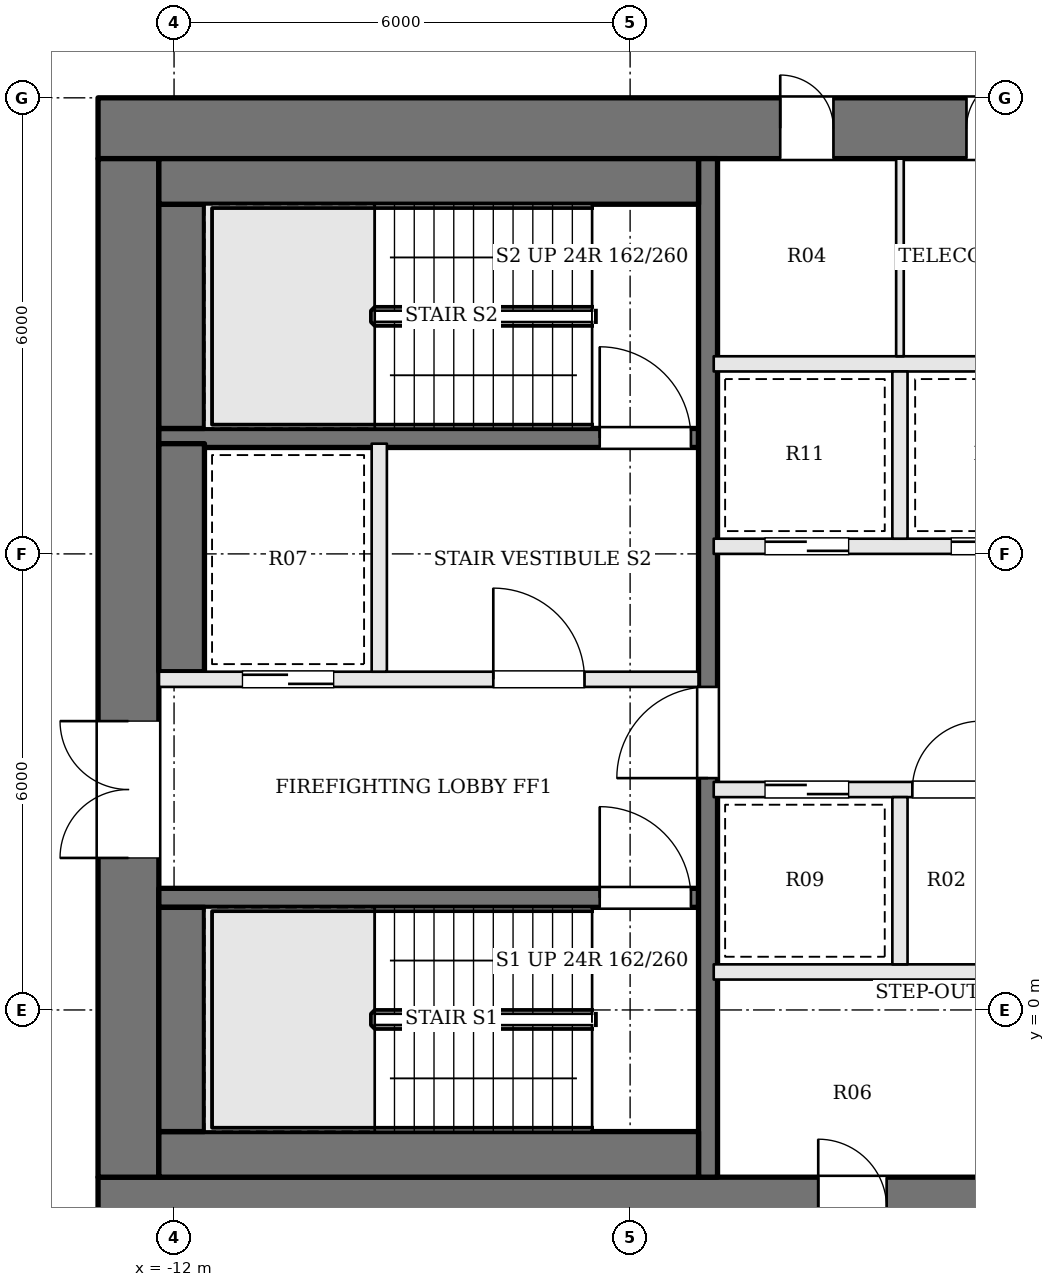
"""IFC4 building model, lengths in metres.
Left out: names, types, materials, properties, quantities, classifications, styles, units other than length and angle.
Written with IfcOpenShell. Run it as: python <this file> out.ifc"""

import sys

from ifc_helpers import new_model, si_unit, direction, frame, frame_2d, origin, place, context, subcontext, project, spatial, rectangle, extrude, element, fill, save


model = new_model("IFC4")
c1 = context("Model", 3, precision=1e-05, world=origin(), true_north=direction((0.0, 1.0)))
c2 = subcontext(c1, "Body", "Model", "MODEL_VIEW")
j1 = project(units=[si_unit("LENGTHUNIT", "METRE"), si_unit("PLANEANGLEUNIT", "RADIAN")], contexts=[c1])
p1 = place(None, origin())
s1 = spatial("IfcSite", under=j1, at=p1, CompositionType="ELEMENT")
p2 = place(p1, origin())
s2 = spatial("IfcBuilding", under=s1, at=p2, CompositionType="ELEMENT")
p3 = place(p2, frame((0.0, 0.0, 189.6)))
s3 = spatial("IfcBuildingStorey", under=s2, at=p3, CompositionType="ELEMENT", Elevation=189.6)
p4 = place(p3, frame((-13.0, 11.6, 0.0), z_axis=(0.0, 0.0, 1.0), x_axis=(1.0, 0.0, 0.0)))
e1 = element("IfcWall", 1, at=p4, inside=s3, PredefinedType="SHEAR", context=c2, shape_type="SweptSolid", body=[
    extrude(rectangle(XDim=26.0, YDim=0.8, at=frame_2d((13.0, 0.0))), origin(), (0.0, 0.0, 1.0), 3.9),
])
p5 = place(p4, frame((8.975, 0.0, 0.0)))
e2 = element("IfcOpeningElement", 2, at=p5, cuts=e1, PredefinedType="OPENING", context=c2, shape_type="SweptSolid", body=[
    extrude(rectangle(XDim=0.7, YDim=2.1, at=frame_2d((0.35, 1.05))), frame((0.0, 0.41, 0.0), z_axis=(0.0, -1.0, 0.0), x_axis=(1.0, 0.0, 0.0)), (0.0, 0.0, 1.0), 0.82),
])
p6 = place(p4, frame((11.425, 0.0, 0.0)))
e3 = element("IfcOpeningElement", 3, at=p6, cuts=e1, PredefinedType="OPENING", context=c2, shape_type="SweptSolid", body=[
    extrude(rectangle(XDim=0.7, YDim=2.1, at=frame_2d((0.35, 1.05))), frame((0.0, 0.41, 0.0), z_axis=(0.0, -1.0, 0.0), x_axis=(1.0, 0.0, 0.0)), (0.0, 0.0, 1.0), 0.82),
])
p7 = place(p4, frame((13.725, 0.0, 0.0)))
e4 = element("IfcOpeningElement", 4, at=p7, cuts=e1, PredefinedType="OPENING", context=c2, shape_type="SweptSolid", body=[
    extrude(rectangle(XDim=1.0, YDim=2.1, at=frame_2d((0.5, 1.05))), frame((0.0, 0.41, 0.0), z_axis=(0.0, -1.0, 0.0), x_axis=(1.0, 0.0, 0.0)), (0.0, 0.0, 1.0), 0.82),
])
p8 = place(p4, frame((16.175, 0.0, 0.0)))
e5 = element("IfcOpeningElement", 5, at=p8, cuts=e1, PredefinedType="OPENING", context=c2, shape_type="SweptSolid", body=[
    extrude(rectangle(XDim=1.0, YDim=2.1, at=frame_2d((0.5, 1.05))), frame((0.0, 0.41, 0.0), z_axis=(0.0, -1.0, 0.0), x_axis=(1.0, 0.0, 0.0)), (0.0, 0.0, 1.0), 0.82),
])
p9 = place(p3, frame((-13.0, -2.6, 0.0), z_axis=(0.0, 0.0, 1.0), x_axis=(1.0, 0.0, 0.0)))
e6 = element("IfcWall", 6, at=p9, inside=s3, PredefinedType="SHEAR", context=c2, shape_type="SweptSolid", body=[
    extrude(rectangle(XDim=26.0, YDim=0.8, at=frame_2d((13.0, 0.0))), origin(), (0.0, 0.0, 1.0), 3.9),
])
p10 = place(p9, frame((9.475, 0.0, 0.0)))
e7 = element("IfcOpeningElement", 7, at=p10, cuts=e6, PredefinedType="OPENING", context=c2, shape_type="SweptSolid", body=[
    extrude(rectangle(XDim=0.9, YDim=2.1, at=frame_2d((0.45, 1.05))), frame((0.0, 0.41, 0.0), z_axis=(0.0, -1.0, 0.0), x_axis=(1.0, 0.0, 0.0)), (0.0, 0.0, 1.0), 0.82),
])
p11 = place(p9, frame((12.75, 0.0, 0.0)))
e8 = element("IfcOpeningElement", 8, at=p11, cuts=e6, PredefinedType="OPENING", context=c2, shape_type="SweptSolid", body=[
    extrude(rectangle(XDim=0.9, YDim=2.1, at=frame_2d((0.45, 1.05))), frame((0.0, 0.41, 0.0), z_axis=(0.0, -1.0, 0.0), x_axis=(1.0, 0.0, 0.0)), (0.0, 0.0, 1.0), 0.82),
])
p12 = place(p9, frame((15.05, 0.0, 0.0)))
e9 = element("IfcOpeningElement", 9, at=p12, cuts=e6, PredefinedType="OPENING", context=c2, shape_type="SweptSolid", body=[
    extrude(rectangle(XDim=1.0, YDim=2.1, at=frame_2d((0.5, 1.05))), frame((0.0, 0.41, 0.0), z_axis=(0.0, -1.0, 0.0), x_axis=(1.0, 0.0, 0.0)), (0.0, 0.0, 1.0), 0.82),
])
p13 = place(p9, frame((16.825, 0.0, 0.0)))
e10 = element("IfcOpeningElement", 10, at=p13, cuts=e6, PredefinedType="OPENING", context=c2, shape_type="SweptSolid", body=[
    extrude(rectangle(XDim=0.7, YDim=2.1, at=frame_2d((0.35, 1.05))), frame((0.0, 0.41, 0.0), z_axis=(0.0, -1.0, 0.0), x_axis=(1.0, 0.0, 0.0)), (0.0, 0.0, 1.0), 0.82),
])
p14 = place(p3, frame((-12.6, -2.2, 0.0), z_axis=(0.0, 0.0, 1.0), x_axis=(0.0, 1.0, 0.0)))
e11 = element("IfcWall", 11, at=p14, inside=s3, PredefinedType="SHEAR", context=c2, shape_type="SweptSolid", body=[
    extrude(rectangle(XDim=13.4, YDim=0.8, at=frame_2d((6.7, 0.0))), origin(), (0.0, 0.0, 1.0), 3.9),
])
p15 = place(p14, frame((4.2, 0.0, 0.0)))
e12 = element("IfcOpeningElement", 12, at=p15, cuts=e11, PredefinedType="OPENING", context=c2, shape_type="SweptSolid", body=[
    extrude(rectangle(XDim=1.8, YDim=2.1, at=frame_2d((0.9, 1.05))), frame((0.0, 0.41, 0.0), z_axis=(0.0, -1.0, 0.0), x_axis=(1.0, 0.0, 0.0)), (0.0, 0.0, 1.0), 0.82),
])
p16 = place(p3, frame((-12.2, 1.475, 0.0), z_axis=(0.0, 0.0, 1.0), x_axis=(1.0, 0.0, 0.0)))
e13 = element("IfcWall", 13, at=p16, inside=s3, PredefinedType="SOLIDWALL", context=c2, shape_type="SweptSolid", body=[
    extrude(rectangle(XDim=7.1, YDim=0.25, at=frame_2d((3.55, 0.0))), origin(), (0.0, 0.0, 1.0), 3.7),
])
p17 = place(p16, frame((5.8, 0.0, 0.0)))
e14 = element("IfcOpeningElement", 14, at=p17, cuts=e13, PredefinedType="OPENING", context=c2, shape_type="SweptSolid", body=[
    extrude(rectangle(XDim=1.2, YDim=2.1, at=frame_2d((0.6, 1.05))), frame((0.0, 0.135, 0.0), z_axis=(0.0, -1.0, 0.0), x_axis=(1.0, 0.0, 0.0)), (0.0, 0.0, 1.0), 0.27),
])
p18 = place(p3, frame((-12.2, 4.35, 0.0), z_axis=(0.0, 0.0, 1.0), x_axis=(1.0, 0.0, 0.0)))
e15 = element("IfcWall", 15, at=p18, inside=s3, PredefinedType="SOLIDWALL", context=c2, shape_type="SweptSolid", body=[
    extrude(rectangle(XDim=7.1, YDim=0.2, at=frame_2d((3.55, 0.0))), origin(), (0.0, 0.0, 1.0), 3.7),
])
p19 = place(p18, frame((4.4, 0.0, 0.0)))
e16 = element("IfcOpeningElement", 16, at=p19, cuts=e15, PredefinedType="OPENING", context=c2, shape_type="SweptSolid", body=[
    extrude(rectangle(XDim=1.2, YDim=2.1, at=frame_2d((0.6, 1.05))), frame((0.0, 0.11, 0.0), z_axis=(0.0, -1.0, 0.0), x_axis=(1.0, 0.0, 0.0)), (0.0, 0.0, 1.0), 0.22),
])
p20 = place(p18, frame((1.1, 0.0, 0.0)))
e17 = element("IfcOpeningElement", 17, at=p20, cuts=e15, PredefinedType="OPENING", context=c2, shape_type="SweptSolid", body=[
    extrude(rectangle(XDim=1.2, YDim=2.1, at=frame_2d((0.6, 1.05))), frame((0.0, 0.11, 0.0), z_axis=(0.0, -1.0, 0.0), x_axis=(1.0, 0.0, 0.0)), (0.0, 0.0, 1.0), 0.22),
])
p21 = place(p3, frame((-12.2, 7.525, 0.0), z_axis=(0.0, 0.0, 1.0), x_axis=(1.0, 0.0, 0.0)))
e18 = element("IfcWall", 18, at=p21, inside=s3, PredefinedType="SOLIDWALL", context=c2, shape_type="SweptSolid", body=[
    extrude(rectangle(XDim=7.1, YDim=0.25, at=frame_2d((3.55, 0.0))), origin(), (0.0, 0.0, 1.0), 3.7),
])
p22 = place(p21, frame((5.8, 0.0, 0.0)))
e19 = element("IfcOpeningElement", 19, at=p22, cuts=e18, PredefinedType="OPENING", context=c2, shape_type="SweptSolid", body=[
    extrude(rectangle(XDim=1.2, YDim=2.1, at=frame_2d((0.6, 1.05))), frame((0.0, 0.135, 0.0), z_axis=(0.0, -1.0, 0.0), x_axis=(1.0, 0.0, 0.0)), (0.0, 0.0, 1.0), 0.27),
])
p23 = place(p3, frame((-9.3, 4.45, 0.0), z_axis=(0.0, 0.0, 1.0), x_axis=(0.0, 1.0, 0.0)))
e20 = element("IfcWall", 20, at=p23, inside=s3, PredefinedType="SOLIDWALL", context=c2, shape_type="SweptSolid", body=[
    extrude(rectangle(XDim=3.0, YDim=0.2, at=frame_2d((1.5, 0.0))), origin(), (0.0, 0.0, 1.0), 3.7),
])
p24 = place(p3, frame((-4.975, -2.2, 0.0), z_axis=(0.0, 0.0, 1.0), x_axis=(0.0, 1.0, 0.0)))
e21 = element("IfcWall", 21, at=p24, inside=s3, PredefinedType="SOLIDWALL", context=c2, shape_type="SweptSolid", body=[
    extrude(rectangle(XDim=13.4, YDim=0.25, at=frame_2d((6.7, 0.0))), origin(), (0.0, 0.0, 1.0), 3.7),
])
p25 = place(p24, frame((5.25, 0.0, 0.0)))
e22 = element("IfcOpeningElement", 22, at=p25, cuts=e21, PredefinedType="OPENING", context=c2, shape_type="SweptSolid", body=[
    extrude(rectangle(XDim=1.2, YDim=2.1, at=frame_2d((0.6, 1.05))), frame((0.0, 0.135, 0.0), z_axis=(0.0, -1.0, 0.0), x_axis=(1.0, 0.0, 0.0)), (0.0, 0.0, 1.0), 0.27),
])
p26 = place(p3, frame((-12.2, -1.9, 0.0), z_axis=(0.0, 0.0, 1.0), x_axis=(1.0, 0.0, 0.0)))
e23 = element("IfcWall", 23, at=p26, inside=s3, PredefinedType="SOLIDWALL", context=c2, shape_type="SweptSolid", body=[
    extrude(rectangle(XDim=7.1, YDim=0.6, at=frame_2d((3.55, 0.0))), origin(), (0.0, 0.0, 1.0), 3.7),
])
p27 = place(p3, frame((-11.9, -1.6, 0.0), z_axis=(0.0, 0.0, 1.0), x_axis=(0.0, 1.0, 0.0)))
e24 = element("IfcWall", 24, at=p27, inside=s3, PredefinedType="SOLIDWALL", context=c2, shape_type="SweptSolid", body=[
    extrude(rectangle(XDim=2.95, YDim=0.6, at=frame_2d((1.475, 0.0))), origin(), (0.0, 0.0, 1.0), 3.7),
])
p28 = place(p3, frame((-11.9, 4.45, 0.0), z_axis=(0.0, 0.0, 1.0), x_axis=(0.0, 1.0, 0.0)))
e25 = element("IfcWall", 25, at=p28, inside=s3, PredefinedType="SOLIDWALL", context=c2, shape_type="SweptSolid", body=[
    extrude(rectangle(XDim=3.0, YDim=0.6, at=frame_2d((1.5, 0.0))), origin(), (0.0, 0.0, 1.0), 3.7),
])
p29 = place(p3, frame((-11.9, 7.65, 0.0), z_axis=(0.0, 0.0, 1.0), x_axis=(0.0, 1.0, 0.0)))
e26 = element("IfcWall", 26, at=p29, inside=s3, PredefinedType="SOLIDWALL", context=c2, shape_type="SweptSolid", body=[
    extrude(rectangle(XDim=2.95, YDim=0.6, at=frame_2d((1.475, 0.0))), origin(), (0.0, 0.0, 1.0), 3.7),
])
p30 = place(p3, frame((-12.2, 10.9, 0.0), z_axis=(0.0, 0.0, 1.0), x_axis=(1.0, 0.0, 0.0)))
e27 = element("IfcWall", 27, at=p30, inside=s3, PredefinedType="SOLIDWALL", context=c2, shape_type="SweptSolid", body=[
    extrude(rectangle(XDim=7.1, YDim=0.6, at=frame_2d((3.55, 0.0))), origin(), (0.0, 0.0, 1.0), 3.7),
])
p31 = place(p3, frame((-4.9, 0.5, 0.0), z_axis=(0.0, 0.0, 1.0), x_axis=(1.0, 0.0, 0.0)))
e28 = element("IfcWall", 28, at=p31, inside=s3, PredefinedType="SOLIDWALL", context=c2, shape_type="SweptSolid", body=[
    extrude(rectangle(XDim=9.8, YDim=0.2, at=frame_2d((4.9, 0.0))), origin(), (0.0, 0.0, 1.0), 3.7),
])
p32 = place(p3, frame((-4.9, 2.9, 0.0), z_axis=(0.0, 0.0, 1.0), x_axis=(1.0, 0.0, 0.0)))
e29 = element("IfcWall", 29, at=p32, inside=s3, PredefinedType="SOLIDWALL", context=c2, shape_type="SweptSolid", body=[
    extrude(rectangle(XDim=9.8, YDim=0.2, at=frame_2d((4.9, 0.0))), origin(), (0.0, 0.0, 1.0), 3.7),
])
p33 = place(p32, frame((0.675, 0.0, 0.0)))
e30 = element("IfcOpeningElement", 30, at=p33, cuts=e29, PredefinedType="OPENING", context=c2, shape_type="SweptSolid", body=[
    extrude(rectangle(XDim=1.1, YDim=2.1, at=frame_2d((0.55, 1.05))), frame((0.0, 0.11, 0.0), z_axis=(0.0, -1.0, 0.0), x_axis=(1.0, 0.0, 0.0)), (0.0, 0.0, 1.0), 0.22),
])
p34 = place(p32, frame((2.613, 0.0, 0.0)))
e31 = element("IfcOpeningElement", 31, at=p34, cuts=e29, PredefinedType="OPENING", context=c2, shape_type="SweptSolid", body=[
    extrude(rectangle(XDim=0.9, YDim=2.1, at=frame_2d((0.45, 1.05))), frame((0.0, 0.11, 0.0), z_axis=(0.0, -1.0, 0.0), x_axis=(1.0, 0.0, 0.0)), (0.0, 0.0, 1.0), 0.22),
])
p35 = place(p32, frame((4.35, 0.0, 0.0)))
e32 = element("IfcOpeningElement", 32, at=p35, cuts=e29, PredefinedType="OPENING", context=c2, shape_type="SweptSolid", body=[
    extrude(rectangle(XDim=1.1, YDim=2.1, at=frame_2d((0.55, 1.05))), frame((0.0, 0.11, 0.0), z_axis=(0.0, -1.0, 0.0), x_axis=(1.0, 0.0, 0.0)), (0.0, 0.0, 1.0), 0.22),
])
p36 = place(p32, frame((7.463, 0.0, 0.0)))
e33 = element("IfcOpeningElement", 33, at=p36, cuts=e29, PredefinedType="OPENING", context=c2, shape_type="SweptSolid", body=[
    extrude(rectangle(XDim=1.0, YDim=2.1, at=frame_2d((0.5, 1.05))), frame((0.0, 0.11, 0.0), z_axis=(0.0, -1.0, 0.0), x_axis=(1.0, 0.0, 0.0)), (0.0, 0.0, 1.0), 0.22),
])
p37 = place(p3, frame((-4.9, 6.1, 0.0), z_axis=(0.0, 0.0, 1.0), x_axis=(1.0, 0.0, 0.0)))
e34 = element("IfcWall", 34, at=p37, inside=s3, PredefinedType="SOLIDWALL", context=c2, shape_type="SweptSolid", body=[
    extrude(rectangle(XDim=9.8, YDim=0.2, at=frame_2d((4.9, 0.0))), origin(), (0.0, 0.0, 1.0), 3.7),
])
p38 = place(p37, frame((0.675, 0.0, 0.0)))
e35 = element("IfcOpeningElement", 35, at=p38, cuts=e34, PredefinedType="OPENING", context=c2, shape_type="SweptSolid", body=[
    extrude(rectangle(XDim=1.1, YDim=2.1, at=frame_2d((0.55, 1.05))), frame((0.0, 0.11, 0.0), z_axis=(0.0, -1.0, 0.0), x_axis=(1.0, 0.0, 0.0)), (0.0, 0.0, 1.0), 0.22),
])
p39 = place(p37, frame((3.125, 0.0, 0.0)))
e36 = element("IfcOpeningElement", 36, at=p39, cuts=e34, PredefinedType="OPENING", context=c2, shape_type="SweptSolid", body=[
    extrude(rectangle(XDim=1.1, YDim=2.1, at=frame_2d((0.55, 1.05))), frame((0.0, 0.11, 0.0), z_axis=(0.0, -1.0, 0.0), x_axis=(1.0, 0.0, 0.0)), (0.0, 0.0, 1.0), 0.22),
])
p40 = place(p37, frame((5.575, 0.0, 0.0)))
e37 = element("IfcOpeningElement", 37, at=p40, cuts=e34, PredefinedType="OPENING", context=c2, shape_type="SweptSolid", body=[
    extrude(rectangle(XDim=1.1, YDim=2.1, at=frame_2d((0.55, 1.05))), frame((0.0, 0.11, 0.0), z_axis=(0.0, -1.0, 0.0), x_axis=(1.0, 0.0, 0.0)), (0.0, 0.0, 1.0), 0.22),
])
p41 = place(p37, frame((8.025, 0.0, 0.0)))
e38 = element("IfcOpeningElement", 38, at=p41, cuts=e34, PredefinedType="OPENING", context=c2, shape_type="SweptSolid", body=[
    extrude(rectangle(XDim=1.1, YDim=2.1, at=frame_2d((0.55, 1.05))), frame((0.0, 0.11, 0.0), z_axis=(0.0, -1.0, 0.0), x_axis=(1.0, 0.0, 0.0)), (0.0, 0.0, 1.0), 0.22),
])
p42 = place(p3, frame((-4.9, 8.5, 0.0), z_axis=(0.0, 0.0, 1.0), x_axis=(1.0, 0.0, 0.0)))
e39 = element("IfcWall", 39, at=p42, inside=s3, PredefinedType="SOLIDWALL", context=c2, shape_type="SweptSolid", body=[
    extrude(rectangle(XDim=9.8, YDim=0.2, at=frame_2d((4.9, 0.0))), origin(), (0.0, 0.0, 1.0), 3.7),
])
for number, where, z_axis, x_axis in (
    (40, (-2.45, 0.6, 0.0), (0.0, 0.0, 1.0), (0.0, 1.0, 0.0)),
    (41, (-2.45, 6.2, 0.0), (0.0, 0.0, 1.0), (0.0, 1.0, 0.0)),
):
    element("IfcWall", number, at=place(p3, frame(where, z_axis=z_axis, x_axis=x_axis)), inside=s3, PredefinedType="SOLIDWALL", context=c2, shape_type="SweptSolid", body=[
        extrude(rectangle(XDim=2.2, YDim=0.2, at=frame_2d((1.1, 0.0))), origin(), (0.0, 0.0, 1.0), 3.7),
    ])
p43 = place(p3, frame((-2.45, 8.6, 0.0), z_axis=(0.0, 0.0, 1.0), x_axis=(0.0, 1.0, 0.0)))
e42 = element("IfcWall", 42, at=p43, inside=s3, PredefinedType="PARTITIONING", context=c2, shape_type="SweptSolid", body=[
    extrude(rectangle(XDim=2.6, YDim=0.1, at=frame_2d((1.3, 0.0))), origin(), (0.0, 0.0, 1.0), 3.7),
])
p44 = place(p15, origin())
e43 = element("IfcDoor", 43, at=p44, inside=s3, OperationType="DOUBLE_DOOR_SINGLE_SWING", PredefinedType="DOOR", context=c2, shape_type="SweptSolid", body=[
    extrude(rectangle(XDim=1.8, YDim=2.1, at=frame_2d((0.9, 1.05))), frame((0.0, 0.025, 0.0), z_axis=(0.0, -1.0, 0.0), x_axis=(1.0, 0.0, 0.0)), (0.0, 0.0, 1.0), 0.05),
])
fill(e12, e43)
p45 = place(p25, origin())
e44 = element("IfcDoor", 44, at=p45, inside=s3, OperationType="SINGLE_SWING_LEFT", PredefinedType="DOOR", context=c2, shape_type="SweptSolid", body=[
    extrude(rectangle(XDim=1.2, YDim=2.1, at=frame_2d((0.6, 1.05))), frame((0.0, 0.025, 0.0), z_axis=(0.0, -1.0, 0.0), x_axis=(1.0, 0.0, 0.0)), (0.0, 0.0, 1.0), 0.05),
])
fill(e22, e44)
p46 = place(p19, origin())
e45 = element("IfcDoor", 45, at=p46, inside=s3, OperationType="SINGLE_SWING_LEFT", PredefinedType="DOOR", context=c2, shape_type="SweptSolid", body=[
    extrude(rectangle(XDim=1.2, YDim=2.1, at=frame_2d((0.6, 1.05))), frame((0.0, 0.025, 0.0), z_axis=(0.0, -1.0, 0.0), x_axis=(1.0, 0.0, 0.0)), (0.0, 0.0, 1.0), 0.05),
])
fill(e16, e45)
p47 = place(p17, origin())
e46 = element("IfcDoor", 46, at=p47, inside=s3, OperationType="SINGLE_SWING_LEFT", PredefinedType="DOOR", context=c2, shape_type="SweptSolid", body=[
    extrude(rectangle(XDim=1.2, YDim=2.1, at=frame_2d((0.6, 1.05))), frame((0.0, 0.025, 0.0), z_axis=(0.0, -1.0, 0.0), x_axis=(1.0, 0.0, 0.0)), (0.0, 0.0, 1.0), 0.05),
])
fill(e14, e46)
p48 = place(p22, origin())
e47 = element("IfcDoor", 47, at=p48, inside=s3, OperationType="SINGLE_SWING_LEFT", PredefinedType="DOOR", context=c2, shape_type="SweptSolid", body=[
    extrude(rectangle(XDim=1.2, YDim=2.1, at=frame_2d((0.6, 1.05))), frame((0.0, 0.025, 0.0), z_axis=(0.0, -1.0, 0.0), x_axis=(1.0, 0.0, 0.0)), (0.0, 0.0, 1.0), 0.05),
])
fill(e19, e47)
p49 = place(p20, origin())
e48 = element("IfcDoor", 48, at=p49, inside=s3, OperationType="SLIDING_TO_RIGHT", PredefinedType="DOOR", context=c2, shape_type="SweptSolid", body=[
    extrude(rectangle(XDim=1.2, YDim=2.1, at=frame_2d((0.6, 1.05))), frame((0.0, 0.025, 0.0), z_axis=(0.0, -1.0, 0.0), x_axis=(1.0, 0.0, 0.0)), (0.0, 0.0, 1.0), 0.05),
])
fill(e17, e48)
p50 = place(p33, origin())
e49 = element("IfcDoor", 49, at=p50, inside=s3, OperationType="SLIDING_TO_RIGHT", PredefinedType="DOOR", context=c2, shape_type="SweptSolid", body=[
    extrude(rectangle(XDim=1.1, YDim=2.1, at=frame_2d((0.55, 1.05))), frame((0.0, 0.025, 0.0), z_axis=(0.0, -1.0, 0.0), x_axis=(1.0, 0.0, 0.0)), (0.0, 0.0, 1.0), 0.05),
])
fill(e30, e49)
p51 = place(p34, origin())
e50 = element("IfcDoor", 50, at=p51, inside=s3, OperationType="SINGLE_SWING_RIGHT", PredefinedType="DOOR", context=c2, shape_type="SweptSolid", body=[
    extrude(rectangle(XDim=0.9, YDim=2.1, at=frame_2d((0.45, 1.05))), frame((0.0, 0.025, 0.0), z_axis=(0.0, -1.0, 0.0), x_axis=(1.0, 0.0, 0.0)), (0.0, 0.0, 1.0), 0.05),
])
fill(e31, e50)
p52 = place(p38, origin())
e51 = element("IfcDoor", 51, at=p52, inside=s3, OperationType="SLIDING_TO_RIGHT", PredefinedType="DOOR", context=c2, shape_type="SweptSolid", body=[
    extrude(rectangle(XDim=1.1, YDim=2.1, at=frame_2d((0.55, 1.05))), frame((0.0, 0.025, 0.0), z_axis=(0.0, -1.0, 0.0), x_axis=(1.0, 0.0, 0.0)), (0.0, 0.0, 1.0), 0.05),
])
fill(e35, e51)
p53 = place(p39, origin())
e52 = element("IfcDoor", 52, at=p53, inside=s3, OperationType="SLIDING_TO_LEFT", PredefinedType="DOOR", context=c2, shape_type="SweptSolid", body=[
    extrude(rectangle(XDim=1.1, YDim=2.1, at=frame_2d((0.55, 1.05))), frame((0.0, 0.025, 0.0), z_axis=(0.0, -1.0, 0.0), x_axis=(1.0, 0.0, 0.0)), (0.0, 0.0, 1.0), 0.05),
])
fill(e36, e52)
p54 = place(p10, origin())
e53 = element("IfcDoor", 53, at=p54, inside=s3, OperationType="SINGLE_SWING_LEFT", PredefinedType="DOOR", context=c2, shape_type="SweptSolid", body=[
    extrude(rectangle(XDim=0.9, YDim=2.1, at=frame_2d((0.45, 1.05))), frame((0.0, 0.025, 0.0), z_axis=(0.0, -1.0, 0.0), x_axis=(1.0, 0.0, 0.0)), (0.0, 0.0, 1.0), 0.05),
])
fill(e7, e53)
p55 = place(p5, origin())
e54 = element("IfcDoor", 54, at=p55, inside=s3, OperationType="SINGLE_SWING_LEFT", PredefinedType="DOOR", context=c2, shape_type="SweptSolid", body=[
    extrude(rectangle(XDim=0.7, YDim=2.1, at=frame_2d((0.35, 1.05))), frame((0.0, 0.025, 0.0), z_axis=(0.0, -1.0, 0.0), x_axis=(1.0, 0.0, 0.0)), (0.0, 0.0, 1.0), 0.05),
])
fill(e2, e54)
p56 = place(p6, origin())
e55 = element("IfcDoor", 55, at=p56, inside=s3, OperationType="SINGLE_SWING_RIGHT", PredefinedType="DOOR", context=c2, shape_type="SweptSolid", body=[
    extrude(rectangle(XDim=0.7, YDim=2.1, at=frame_2d((0.35, 1.05))), frame((0.0, 0.025, 0.0), z_axis=(0.0, -1.0, 0.0), x_axis=(1.0, 0.0, 0.0)), (0.0, 0.0, 1.0), 0.05),
])
fill(e3, e55)
save(model, sys.argv[1])
